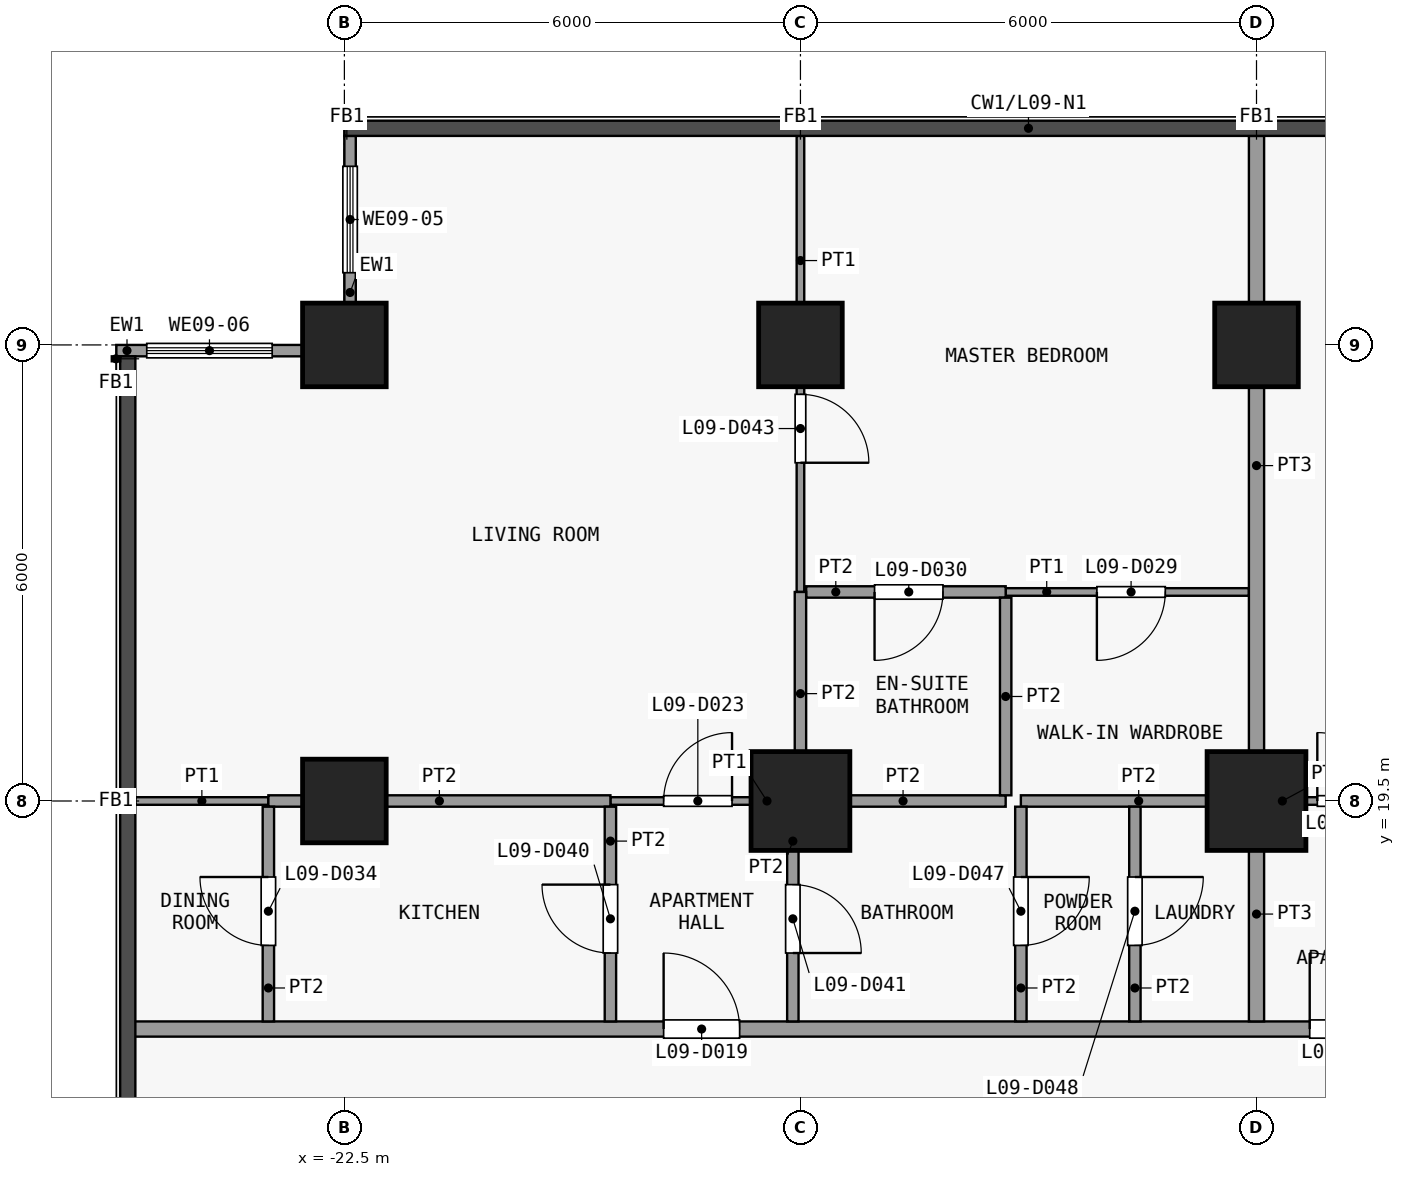
"""IFC4 building model, lengths in metres.
Left out: names, types, materials, properties, quantities, classifications, styles, units other than length and angle.
Written with IfcOpenShell. Run it as: python <this file> out.ifc"""

import sys

from ifc_helpers import new_model, si_unit, direction, frame, frame_2d, origin, origin_2d, place, context, subcontext, project, spatial, rectangle, extrude, element, fill, save


model = new_model("IFC4")
c1 = context("Model", 3, precision=1e-05, world=origin(), true_north=direction((0.0, 1.0)))
c2 = subcontext(c1, "Body", "Model", "MODEL_VIEW")
j1 = project(units=[si_unit("LENGTHUNIT", "METRE"), si_unit("PLANEANGLEUNIT", "RADIAN")], contexts=[c1])
p1 = place(None, origin())
s1 = spatial("IfcSite", under=j1, at=p1, CompositionType="ELEMENT")
p2 = place(p1, origin())
s2 = spatial("IfcBuilding", under=s1, at=p2, CompositionType="ELEMENT")
p3 = place(p2, frame((0.0, 0.0, 43.3)))
s3 = spatial("IfcBuildingStorey", under=s2, at=p3, CompositionType="ELEMENT", Elevation=43.3)
for number, where, z_axis, x_axis in (
    (1, (-22.5, 19.5, 0.0), (0.0, 0.0, 1.0), (1.0, 0.0, 0.0)),
    (2, (-22.5, 25.5, 0.0), (0.0, 0.0, 1.0), (1.0, 0.0, 0.0)),
):
    element("IfcColumn", number, at=place(p3, frame(where, z_axis=z_axis, x_axis=x_axis)), inside=s3, PredefinedType="COLUMN", context=c2, shape_type="SweptSolid", body=[
        extrude(rectangle(XDim=1.1, YDim=1.1, at=origin_2d()), origin(), (0.0, 0.0, 1.0), 3.6),
    ])
p4 = place(p3, frame((-16.5, 19.5, 0.0), z_axis=(0.0, 0.0, 1.0), x_axis=(1.0, 0.0, 0.0)))
e3 = element("IfcColumn", 3, at=p4, inside=s3, PredefinedType="COLUMN", context=c2, shape_type="SweptSolid", body=[
    extrude(rectangle(XDim=1.3, YDim=1.3, at=origin_2d()), origin(), (0.0, 0.0, 1.0), 3.6),
])
p5 = place(p3, frame((-16.5, 25.5, 0.0), z_axis=(0.0, 0.0, 1.0), x_axis=(1.0, 0.0, 0.0)))
e4 = element("IfcColumn", 4, at=p5, inside=s3, PredefinedType="COLUMN", context=c2, shape_type="SweptSolid", body=[
    extrude(rectangle(XDim=1.1, YDim=1.1, at=origin_2d()), origin(), (0.0, 0.0, 1.0), 3.6),
])
p6 = place(p3, frame((-10.5, 19.5, 0.0), z_axis=(0.0, 0.0, 1.0), x_axis=(1.0, 0.0, 0.0)))
e5 = element("IfcColumn", 5, at=p6, inside=s3, PredefinedType="COLUMN", context=c2, shape_type="SweptSolid", body=[
    extrude(rectangle(XDim=1.3, YDim=1.3, at=origin_2d()), origin(), (0.0, 0.0, 1.0), 3.6),
])
p7 = place(p3, frame((-10.5, 25.5, 0.0), z_axis=(0.0, 0.0, 1.0), x_axis=(1.0, 0.0, 0.0)))
e6 = element("IfcColumn", 6, at=p7, inside=s3, PredefinedType="COLUMN", context=c2, shape_type="SweptSolid", body=[
    extrude(rectangle(XDim=1.1, YDim=1.1, at=origin_2d()), origin(), (0.0, 0.0, 1.0), 3.6),
])
p8 = place(p3, frame((-22.425, 26.05, 0.0), z_axis=(0.0, 0.0, 1.0), x_axis=(0.0, 1.0, 0.0)))
e7 = element("IfcWall", 7, at=p8, inside=s3, PredefinedType="SOLIDWALL", context=c2, shape_type="SweptSolid", body=[
    extrude(rectangle(XDim=2.2, YDim=0.15, at=frame_2d((1.1, 0.0))), origin(), (0.0, 0.0, 1.0), 3.3),
])
p9 = place(p8, frame((0.4, 0.0, 0.9)))
e8 = element("IfcOpeningElement", 8, at=p9, cuts=e7, PredefinedType="OPENING", context=c2, shape_type="SweptSolid", body=[
    extrude(rectangle(XDim=1.4, YDim=2.4, at=frame_2d((0.7, 1.2))), frame((0.0, 0.085, 0.0), z_axis=(0.0, -1.0, 0.0), x_axis=(1.0, 0.0, 0.0)), (0.0, 0.0, 1.0), 0.17),
])
p10 = place(p3, frame((-25.5, 25.425, 0.0), z_axis=(0.0, 0.0, 1.0), x_axis=(1.0, 0.0, 0.0)))
e9 = element("IfcWall", 9, at=p10, inside=s3, PredefinedType="SOLIDWALL", context=c2, shape_type="SweptSolid", body=[
    extrude(rectangle(XDim=2.45, YDim=0.15, at=frame_2d((1.225, 0.0))), origin(), (0.0, 0.0, 1.0), 3.3),
])
p11 = place(p10, frame((0.4, 0.0, 0.9)))
e10 = element("IfcOpeningElement", 10, at=p11, cuts=e9, PredefinedType="OPENING", context=c2, shape_type="SweptSolid", body=[
    extrude(rectangle(XDim=1.65, YDim=2.4, at=frame_2d((0.825, 1.2))), frame((0.0, 0.085, 0.0), z_axis=(0.0, -1.0, 0.0), x_axis=(1.0, 0.0, 0.0)), (0.0, 0.0, 1.0), 0.17),
])
p12 = place(p3, frame((-25.35, 16.5, 0.0), z_axis=(0.0, 0.0, 1.0), x_axis=(1.0, 0.0, 0.0)))
e11 = element("IfcWall", 11, at=p12, inside=s3, PredefinedType="PARTITIONING", context=c2, shape_type="SweptSolid", body=[
    extrude(rectangle(XDim=50.7, YDim=0.2, at=frame_2d((25.35, 0.0))), origin(), (0.0, 0.0, 1.0), 3.3),
])
p13 = place(p12, frame((7.05, 0.0, 0.0)))
e12 = element("IfcOpeningElement", 12, at=p13, cuts=e11, PredefinedType="OPENING", context=c2, shape_type="SweptSolid", body=[
    extrude(rectangle(XDim=1.0, YDim=2.1, at=frame_2d((0.5, 1.05))), frame((0.0, 0.11, 0.0), z_axis=(0.0, -1.0, 0.0), x_axis=(1.0, 0.0, 0.0)), (0.0, 0.0, 1.0), 0.22),
])
p14 = place(p12, frame((15.55, 0.0, 0.0)))
e13 = element("IfcOpeningElement", 13, at=p14, cuts=e11, PredefinedType="OPENING", context=c2, shape_type="SweptSolid", body=[
    extrude(rectangle(XDim=1.0, YDim=2.1, at=frame_2d((0.5, 1.05))), frame((0.0, 0.11, 0.0), z_axis=(0.0, -1.0, 0.0), x_axis=(1.0, 0.0, 0.0)), (0.0, 0.0, 1.0), 0.22),
])
p15 = place(p12, frame((30.55, 0.0, 0.0)))
e14 = element("IfcOpeningElement", 14, at=p15, cuts=e11, PredefinedType="OPENING", context=c2, shape_type="SweptSolid", body=[
    extrude(rectangle(XDim=1.0, YDim=2.1, at=frame_2d((0.5, 1.05))), frame((0.0, 0.11, 0.0), z_axis=(0.0, -1.0, 0.0), x_axis=(1.0, 0.0, 0.0)), (0.0, 0.0, 1.0), 0.22),
])
p16 = place(p12, frame((45.05, 0.0, 0.0)))
e15 = element("IfcOpeningElement", 15, at=p16, cuts=e11, PredefinedType="OPENING", context=c2, shape_type="SweptSolid", body=[
    extrude(rectangle(XDim=1.0, YDim=2.1, at=frame_2d((0.5, 1.05))), frame((0.0, 0.11, 0.0), z_axis=(0.0, -1.0, 0.0), x_axis=(1.0, 0.0, 0.0)), (0.0, 0.0, 1.0), 0.22),
])
p17 = place(p3, frame((-25.25, 19.5, 0.0), z_axis=(0.0, 0.0, 1.0), x_axis=(1.0, 0.0, 0.0)))
e16 = element("IfcWall", 16, at=p17, inside=s3, PredefinedType="PARTITIONING", context=c2, shape_type="SweptSolid", body=[
    extrude(rectangle(XDim=1.75, YDim=0.1, at=frame_2d((0.875, 0.0))), origin(), (0.0, 0.0, 1.0), 3.3),
])
p18 = place(p3, frame((-19.0, 19.5, 0.0), z_axis=(0.0, 0.0, 1.0), x_axis=(1.0, 0.0, 0.0)))
e17 = element("IfcWall", 17, at=p18, inside=s3, PredefinedType="PARTITIONING", context=c2, shape_type="SweptSolid", body=[
    extrude(rectangle(XDim=2.4, YDim=0.1, at=frame_2d((1.2, 0.0))), origin(), (0.0, 0.0, 1.0), 3.3),
])
p19 = place(p18, frame((0.7, 0.0, 0.0)))
e18 = element("IfcOpeningElement", 18, at=p19, cuts=e17, PredefinedType="OPENING", context=c2, shape_type="SweptSolid", body=[
    extrude(rectangle(XDim=0.9, YDim=2.1, at=frame_2d((0.45, 1.05))), frame((0.0, 0.06, 0.0), z_axis=(0.0, -1.0, 0.0), x_axis=(1.0, 0.0, 0.0)), (0.0, 0.0, 1.0), 0.12),
])
p20 = place(p3, frame((-10.5, 19.5, 0.0), z_axis=(0.0, 0.0, 1.0), x_axis=(1.0, 0.0, 0.0)))
e19 = element("IfcWall", 19, at=p20, inside=s3, PredefinedType="PARTITIONING", context=c2, shape_type="SweptSolid", body=[
    extrude(rectangle(XDim=2.4, YDim=0.1, at=frame_2d((1.2, 0.0))), origin(), (0.0, 0.0, 1.0), 3.3),
])
p21 = place(p20, frame((0.8, 0.0, 0.0)))
e20 = element("IfcOpeningElement", 20, at=p21, cuts=e19, PredefinedType="OPENING", context=c2, shape_type="SweptSolid", body=[
    extrude(rectangle(XDim=0.9, YDim=2.1, at=frame_2d((0.45, 1.05))), frame((0.0, 0.06, 0.0), z_axis=(0.0, -1.0, 0.0), x_axis=(1.0, 0.0, 0.0)), (0.0, 0.0, 1.0), 0.12),
])
p22 = place(p3, frame((-23.5, 19.5, 0.0), z_axis=(0.0, 0.0, 1.0), x_axis=(1.0, 0.0, 0.0)))
e21 = element("IfcWall", 21, at=p22, inside=s3, PredefinedType="PARTITIONING", context=c2, shape_type="SweptSolid", body=[
    extrude(rectangle(XDim=4.5, YDim=0.15, at=frame_2d((2.25, 0.0))), origin(), (0.0, 0.0, 1.0), 3.3),
])
p23 = place(p3, frame((-16.5, 19.5, 0.0), z_axis=(0.0, 0.0, 1.0), x_axis=(1.0, 0.0, 0.0)))
e22 = element("IfcWall", 22, at=p23, inside=s3, PredefinedType="PARTITIONING", context=c2, shape_type="SweptSolid", body=[
    extrude(rectangle(XDim=2.7, YDim=0.15, at=frame_2d((1.35, 0.0))), origin(), (0.0, 0.0, 1.0), 3.3),
])
p24 = place(p3, frame((-13.6, 19.5, 0.0), z_axis=(0.0, 0.0, 1.0), x_axis=(1.0, 0.0, 0.0)))
e23 = element("IfcWall", 23, at=p24, inside=s3, PredefinedType="PARTITIONING", context=c2, shape_type="SweptSolid", body=[
    extrude(rectangle(XDim=3.1, YDim=0.15, at=frame_2d((1.55, 0.0))), origin(), (0.0, 0.0, 1.0), 3.3),
])
p25 = place(p3, frame((-13.8, 22.25, 0.0), z_axis=(0.0, 0.0, 1.0), x_axis=(1.0, 0.0, 0.0)))
e24 = element("IfcWall", 24, at=p25, inside=s3, PredefinedType="PARTITIONING", context=c2, shape_type="SweptSolid", body=[
    extrude(rectangle(XDim=3.2, YDim=0.1, at=frame_2d((1.6, 0.0))), origin(), (0.0, 0.0, 1.0), 3.3),
])
p26 = place(p25, frame((1.2, 0.0, 0.0)))
e25 = element("IfcOpeningElement", 25, at=p26, cuts=e24, PredefinedType="OPENING", context=c2, shape_type="SweptSolid", body=[
    extrude(rectangle(XDim=0.9, YDim=2.1, at=frame_2d((0.45, 1.05))), frame((0.0, 0.06, 0.0), z_axis=(0.0, -1.0, 0.0), x_axis=(1.0, 0.0, 0.0)), (0.0, 0.0, 1.0), 0.12),
])
p27 = place(p3, frame((-16.425, 22.25, 0.0), z_axis=(0.0, 0.0, 1.0), x_axis=(1.0, 0.0, 0.0)))
e26 = element("IfcWall", 26, at=p27, inside=s3, PredefinedType="PARTITIONING", context=c2, shape_type="SweptSolid", body=[
    extrude(rectangle(XDim=2.625, YDim=0.15, at=frame_2d((1.312, 0.0))), origin(), (0.0, 0.0, 1.0), 3.3),
])
p28 = place(p27, frame((0.9, 0.0, 0.0)))
e27 = element("IfcOpeningElement", 27, at=p28, cuts=e26, PredefinedType="OPENING", context=c2, shape_type="SweptSolid", body=[
    extrude(rectangle(XDim=0.9, YDim=2.1, at=frame_2d((0.45, 1.05))), frame((0.0, 0.085, 0.0), z_axis=(0.0, -1.0, 0.0), x_axis=(1.0, 0.0, 0.0)), (0.0, 0.0, 1.0), 0.17),
])
p29 = place(p3, frame((-23.5, 16.6, 0.0), z_axis=(0.0, 0.0, 1.0), x_axis=(0.0, 1.0, 0.0)))
e28 = element("IfcWall", 28, at=p29, inside=s3, PredefinedType="PARTITIONING", context=c2, shape_type="SweptSolid", body=[
    extrude(rectangle(XDim=2.825, YDim=0.15, at=frame_2d((1.413, 0.0))), origin(), (0.0, 0.0, 1.0), 3.3),
])
p30 = place(p29, frame((1.0, 0.0, 0.0)))
e29 = element("IfcOpeningElement", 29, at=p30, cuts=e28, PredefinedType="OPENING", context=c2, shape_type="SweptSolid", body=[
    extrude(rectangle(XDim=0.9, YDim=2.1, at=frame_2d((0.45, 1.05))), frame((0.0, 0.085, 0.0), z_axis=(0.0, -1.0, 0.0), x_axis=(1.0, 0.0, 0.0)), (0.0, 0.0, 1.0), 0.17),
])
p31 = place(p3, frame((-19.0, 16.6, 0.0), z_axis=(0.0, 0.0, 1.0), x_axis=(0.0, 1.0, 0.0)))
e30 = element("IfcWall", 30, at=p31, inside=s3, PredefinedType="PARTITIONING", context=c2, shape_type="SweptSolid", body=[
    extrude(rectangle(XDim=2.825, YDim=0.15, at=frame_2d((1.413, 0.0))), origin(), (0.0, 0.0, 1.0), 3.3),
])
p32 = place(p31, frame((0.9, 0.0, 0.0)))
e31 = element("IfcOpeningElement", 31, at=p32, cuts=e30, PredefinedType="OPENING", context=c2, shape_type="SweptSolid", body=[
    extrude(rectangle(XDim=0.9, YDim=2.1, at=frame_2d((0.45, 1.05))), frame((0.0, 0.085, 0.0), z_axis=(0.0, -1.0, 0.0), x_axis=(1.0, 0.0, 0.0)), (0.0, 0.0, 1.0), 0.17),
])
p33 = place(p3, frame((-16.6, 16.6, 0.0), z_axis=(0.0, 0.0, 1.0), x_axis=(0.0, 1.0, 0.0)))
e32 = element("IfcWall", 32, at=p33, inside=s3, PredefinedType="PARTITIONING", context=c2, shape_type="SweptSolid", body=[
    extrude(rectangle(XDim=2.825, YDim=0.15, at=frame_2d((1.413, 0.0))), origin(), (0.0, 0.0, 1.0), 3.3),
])
p34 = place(p33, frame((0.9, 0.0, 0.0)))
e33 = element("IfcOpeningElement", 33, at=p34, cuts=e32, PredefinedType="OPENING", context=c2, shape_type="SweptSolid", body=[
    extrude(rectangle(XDim=0.9, YDim=2.1, at=frame_2d((0.45, 1.05))), frame((0.0, 0.085, 0.0), z_axis=(0.0, -1.0, 0.0), x_axis=(1.0, 0.0, 0.0)), (0.0, 0.0, 1.0), 0.17),
])
p35 = place(p3, frame((-16.5, 22.25, 0.0), z_axis=(0.0, 0.0, 1.0), x_axis=(0.0, 1.0, 0.0)))
e34 = element("IfcWall", 34, at=p35, inside=s3, PredefinedType="PARTITIONING", context=c2, shape_type="SweptSolid", body=[
    extrude(rectangle(XDim=6.0, YDim=0.1, at=frame_2d((3.0, 0.0))), origin(), (0.0, 0.0, 1.0), 3.3),
])
p36 = place(p35, frame((1.7, 0.0, 0.0)))
e35 = element("IfcOpeningElement", 35, at=p36, cuts=e34, PredefinedType="OPENING", context=c2, shape_type="SweptSolid", body=[
    extrude(rectangle(XDim=0.9, YDim=2.1, at=frame_2d((0.45, 1.05))), frame((0.0, 0.06, 0.0), z_axis=(0.0, -1.0, 0.0), x_axis=(1.0, 0.0, 0.0)), (0.0, 0.0, 1.0), 0.12),
])
p37 = place(p3, frame((-16.5, 19.575, 0.0), z_axis=(0.0, 0.0, 1.0), x_axis=(0.0, 1.0, 0.0)))
e36 = element("IfcWall", 36, at=p37, inside=s3, PredefinedType="PARTITIONING", context=c2, shape_type="SweptSolid", body=[
    extrude(rectangle(XDim=2.675, YDim=0.15, at=frame_2d((1.337, 0.0))), origin(), (0.0, 0.0, 1.0), 3.3),
])
p38 = place(p3, frame((-13.8, 19.575, 0.0), z_axis=(0.0, 0.0, 1.0), x_axis=(0.0, 1.0, 0.0)))
e37 = element("IfcWall", 37, at=p38, inside=s3, PredefinedType="PARTITIONING", context=c2, shape_type="SweptSolid", body=[
    extrude(rectangle(XDim=2.6, YDim=0.15, at=frame_2d((1.3, 0.0))), origin(), (0.0, 0.0, 1.0), 3.3),
])
p39 = place(p3, frame((-13.6, 16.6, 0.0), z_axis=(0.0, 0.0, 1.0), x_axis=(0.0, 1.0, 0.0)))
e38 = element("IfcWall", 38, at=p39, inside=s3, PredefinedType="PARTITIONING", context=c2, shape_type="SweptSolid", body=[
    extrude(rectangle(XDim=2.825, YDim=0.15, at=frame_2d((1.413, 0.0))), origin(), (0.0, 0.0, 1.0), 3.3),
])
p40 = place(p39, frame((1.0, 0.0, 0.0)))
e39 = element("IfcOpeningElement", 39, at=p40, cuts=e38, PredefinedType="OPENING", context=c2, shape_type="SweptSolid", body=[
    extrude(rectangle(XDim=0.9, YDim=2.1, at=frame_2d((0.45, 1.05))), frame((0.0, 0.085, 0.0), z_axis=(0.0, -1.0, 0.0), x_axis=(1.0, 0.0, 0.0)), (0.0, 0.0, 1.0), 0.17),
])
p41 = place(p3, frame((-12.1, 16.6, 0.0), z_axis=(0.0, 0.0, 1.0), x_axis=(0.0, 1.0, 0.0)))
e40 = element("IfcWall", 40, at=p41, inside=s3, PredefinedType="PARTITIONING", context=c2, shape_type="SweptSolid", body=[
    extrude(rectangle(XDim=2.825, YDim=0.15, at=frame_2d((1.413, 0.0))), origin(), (0.0, 0.0, 1.0), 3.3),
])
p42 = place(p41, frame((1.0, 0.0, 0.0)))
e41 = element("IfcOpeningElement", 41, at=p42, cuts=e40, PredefinedType="OPENING", context=c2, shape_type="SweptSolid", body=[
    extrude(rectangle(XDim=0.9, YDim=2.1, at=frame_2d((0.45, 1.05))), frame((0.0, 0.085, 0.0), z_axis=(0.0, -1.0, 0.0), x_axis=(1.0, 0.0, 0.0)), (0.0, 0.0, 1.0), 0.17),
])
p43 = place(p3, frame((-10.5, 16.6, 0.0), z_axis=(0.0, 0.0, 1.0), x_axis=(0.0, 1.0, 0.0)))
e42 = element("IfcWall", 42, at=p43, inside=s3, PredefinedType="PARTITIONING", context=c2, shape_type="SweptSolid", body=[
    extrude(rectangle(XDim=2.825, YDim=0.2, at=frame_2d((1.413, 0.0))), origin(), (0.0, 0.0, 1.0), 3.3),
])
p44 = place(p3, frame((-10.5, 19.575, 0.0), z_axis=(0.0, 0.0, 1.0), x_axis=(0.0, 1.0, 0.0)))
e43 = element("IfcWall", 43, at=p44, inside=s3, PredefinedType="PARTITIONING", context=c2, shape_type="SweptSolid", body=[
    extrude(rectangle(XDim=8.675, YDim=0.2, at=frame_2d((4.337, 0.0))), origin(), (0.0, 0.0, 1.0), 3.3),
])
p45 = place(p9, origin())
e44 = element("IfcWindow", 44, at=p45, inside=s3, PartitioningType="SINGLE_PANEL", PredefinedType="WINDOW", context=c2, shape_type="SweptSolid", body=[
    extrude(rectangle(XDim=1.4, YDim=2.4, at=frame_2d((0.7, 1.2))), frame((0.0, 0.03, 0.0), z_axis=(0.0, -1.0, 0.0), x_axis=(1.0, 0.0, 0.0)), (0.0, 0.0, 1.0), 0.06),
])
fill(e8, e44)
p46 = place(p11, origin())
e45 = element("IfcWindow", 45, at=p46, inside=s3, PartitioningType="SINGLE_PANEL", PredefinedType="WINDOW", context=c2, shape_type="SweptSolid", body=[
    extrude(rectangle(XDim=1.65, YDim=2.4, at=frame_2d((0.825, 1.2))), frame((0.0, 0.03, 0.0), z_axis=(0.0, -1.0, 0.0), x_axis=(1.0, 0.0, 0.0)), (0.0, 0.0, 1.0), 0.06),
])
fill(e10, e45)
p47 = place(p13, origin())
e46 = element("IfcDoor", 46, at=p47, inside=s3, OperationType="SINGLE_SWING_RIGHT", PredefinedType="DOOR", context=c2, shape_type="SweptSolid", body=[
    extrude(rectangle(XDim=1.0, YDim=2.1, at=frame_2d((0.5, 1.05))), frame((0.0, 0.025, 0.0), z_axis=(0.0, -1.0, 0.0), x_axis=(1.0, 0.0, 0.0)), (0.0, 0.0, 1.0), 0.05),
])
fill(e12, e46)
p48 = place(p14, origin())
e47 = element("IfcDoor", 47, at=p48, inside=s3, OperationType="SINGLE_SWING_RIGHT", PredefinedType="DOOR", context=c2, shape_type="SweptSolid", body=[
    extrude(rectangle(XDim=1.0, YDim=2.1, at=frame_2d((0.5, 1.05))), frame((0.0, 0.025, 0.0), z_axis=(0.0, -1.0, 0.0), x_axis=(1.0, 0.0, 0.0)), (0.0, 0.0, 1.0), 0.05),
])
fill(e13, e47)
p49 = place(p19, origin())
e48 = element("IfcDoor", 48, at=p49, inside=s3, OperationType="SINGLE_SWING_LEFT", PredefinedType="DOOR", context=c2, shape_type="SweptSolid", body=[
    extrude(rectangle(XDim=0.9, YDim=2.1, at=frame_2d((0.45, 1.05))), frame((0.0, 0.025, 0.0), z_axis=(0.0, -1.0, 0.0), x_axis=(1.0, 0.0, 0.0)), (0.0, 0.0, 1.0), 0.05),
])
fill(e18, e48)
p50 = place(p21, origin())
e49 = element("IfcDoor", 49, at=p50, inside=s3, OperationType="SINGLE_SWING_RIGHT", PredefinedType="DOOR", context=c2, shape_type="SweptSolid", body=[
    extrude(rectangle(XDim=0.9, YDim=2.1, at=frame_2d((0.45, 1.05))), frame((0.0, 0.025, 0.0), z_axis=(0.0, -1.0, 0.0), x_axis=(1.0, 0.0, 0.0)), (0.0, 0.0, 1.0), 0.05),
])
fill(e20, e49)
p51 = place(p26, origin())
e50 = element("IfcDoor", 50, at=p51, inside=s3, OperationType="SINGLE_SWING_LEFT", PredefinedType="DOOR", context=c2, shape_type="SweptSolid", body=[
    extrude(rectangle(XDim=0.9, YDim=2.1, at=frame_2d((0.45, 1.05))), frame((0.0, 0.025, 0.0), z_axis=(0.0, -1.0, 0.0), x_axis=(1.0, 0.0, 0.0)), (0.0, 0.0, 1.0), 0.05),
])
fill(e25, e50)
p52 = place(p28, origin())
e51 = element("IfcDoor", 51, at=p52, inside=s3, OperationType="SINGLE_SWING_LEFT", PredefinedType="DOOR", context=c2, shape_type="SweptSolid", body=[
    extrude(rectangle(XDim=0.9, YDim=2.1, at=frame_2d((0.45, 1.05))), frame((0.0, 0.025, 0.0), z_axis=(0.0, -1.0, 0.0), x_axis=(1.0, 0.0, 0.0)), (0.0, 0.0, 1.0), 0.05),
])
fill(e27, e51)
p53 = place(p30, origin())
e52 = element("IfcDoor", 52, at=p53, inside=s3, OperationType="SINGLE_SWING_LEFT", PredefinedType="DOOR", context=c2, shape_type="SweptSolid", body=[
    extrude(rectangle(XDim=0.9, YDim=2.1, at=frame_2d((0.45, 1.05))), frame((0.0, 0.025, 0.0), z_axis=(0.0, -1.0, 0.0), x_axis=(1.0, 0.0, 0.0)), (0.0, 0.0, 1.0), 0.05),
])
fill(e29, e52)
p54 = place(p32, origin())
e53 = element("IfcDoor", 53, at=p54, inside=s3, OperationType="SINGLE_SWING_LEFT", PredefinedType="DOOR", context=c2, shape_type="SweptSolid", body=[
    extrude(rectangle(XDim=0.9, YDim=2.1, at=frame_2d((0.45, 1.05))), frame((0.0, 0.025, 0.0), z_axis=(0.0, -1.0, 0.0), x_axis=(1.0, 0.0, 0.0)), (0.0, 0.0, 1.0), 0.05),
])
fill(e31, e53)
p55 = place(p34, origin())
e54 = element("IfcDoor", 54, at=p55, inside=s3, OperationType="SINGLE_SWING_LEFT", PredefinedType="DOOR", context=c2, shape_type="SweptSolid", body=[
    extrude(rectangle(XDim=0.9, YDim=2.1, at=frame_2d((0.45, 1.05))), frame((0.0, 0.025, 0.0), z_axis=(0.0, -1.0, 0.0), x_axis=(1.0, 0.0, 0.0)), (0.0, 0.0, 1.0), 0.05),
])
fill(e33, e54)
p56 = place(p36, origin())
e55 = element("IfcDoor", 55, at=p56, inside=s3, OperationType="SINGLE_SWING_LEFT", PredefinedType="DOOR", context=c2, shape_type="SweptSolid", body=[
    extrude(rectangle(XDim=0.9, YDim=2.1, at=frame_2d((0.45, 1.05))), frame((0.0, 0.025, 0.0), z_axis=(0.0, -1.0, 0.0), x_axis=(1.0, 0.0, 0.0)), (0.0, 0.0, 1.0), 0.05),
])
fill(e35, e55)
p57 = place(p40, origin())
e56 = element("IfcDoor", 56, at=p57, inside=s3, OperationType="SINGLE_SWING_RIGHT", PredefinedType="DOOR", context=c2, shape_type="SweptSolid", body=[
    extrude(rectangle(XDim=0.9, YDim=2.1, at=frame_2d((0.45, 1.05))), frame((0.0, 0.025, 0.0), z_axis=(0.0, -1.0, 0.0), x_axis=(1.0, 0.0, 0.0)), (0.0, 0.0, 1.0), 0.05),
])
fill(e39, e56)
p58 = place(p42, origin())
e57 = element("IfcDoor", 57, at=p58, inside=s3, OperationType="SINGLE_SWING_RIGHT", PredefinedType="DOOR", context=c2, shape_type="SweptSolid", body=[
    extrude(rectangle(XDim=0.9, YDim=2.1, at=frame_2d((0.45, 1.05))), frame((0.0, 0.025, 0.0), z_axis=(0.0, -1.0, 0.0), x_axis=(1.0, 0.0, 0.0)), (0.0, 0.0, 1.0), 0.05),
])
fill(e41, e57)
save(model, sys.argv[1])
